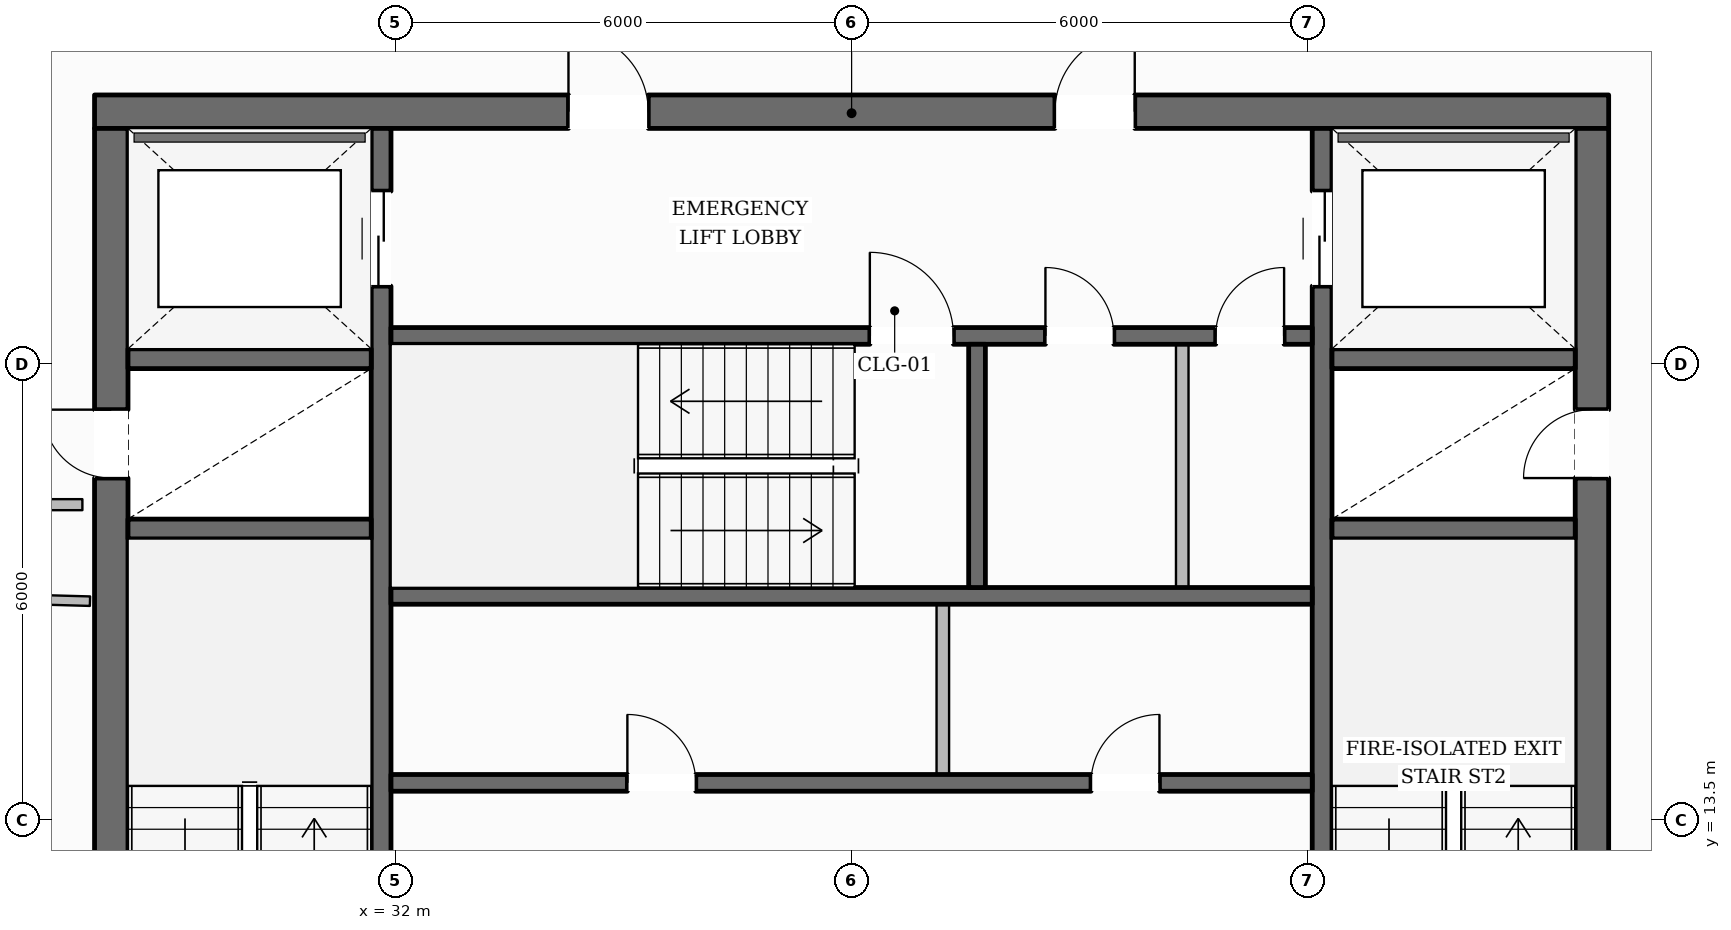
"""IFC4 building model, lengths in metres.
Left out: names, types, materials, properties, quantities, classifications, styles, units other than length and angle.
Written with IfcOpenShell. Run it as: python <this file> out.ifc"""

import sys

from ifc_helpers import new_model, si_unit, direction, frame, frame_2d, origin, place, context, subcontext, project, spatial, rectangle, extrude, element, fill, save


model = new_model("IFC4")
c1 = context("Model", 3, precision=1e-05, world=origin(), true_north=direction((0.0, 1.0)))
c2 = subcontext(c1, "Body", "Model", "MODEL_VIEW")
j1 = project(units=[si_unit("LENGTHUNIT", "METRE"), si_unit("PLANEANGLEUNIT", "RADIAN")], contexts=[c1])
p1 = place(None, origin())
s1 = spatial("IfcSite", under=j1, at=p1, CompositionType="ELEMENT")
p2 = place(p1, origin())
s2 = spatial("IfcBuilding", under=s1, at=p2, CompositionType="ELEMENT")
p3 = place(p2, frame((0.0, 0.0, 222.75)))
s3 = spatial("IfcBuildingStorey", under=s2, at=p3, CompositionType="ELEMENT", Elevation=222.75)
p4 = place(p3, frame((28.04, 22.82, 0.0), z_axis=(0.0, 0.0, 1.0), x_axis=(1.0, 0.0, 0.0)))
e1 = element("IfcWall", 1, at=p4, inside=s3, PredefinedType="SOLIDWALL", context=c2, shape_type="SweptSolid", body=[
    extrude(rectangle(XDim=19.92, YDim=0.44, at=frame_2d((9.96, 0.0))), origin(), (0.0, 0.0, 1.0), 3.6),
])
p5 = place(p4, frame((6.235, 0.0, 0.0)))
e2 = element("IfcOpeningElement", 2, at=p5, cuts=e1, PredefinedType="OPENING", context=c2, shape_type="SweptSolid", body=[
    extrude(rectangle(XDim=1.05, YDim=2.15, at=frame_2d((0.525, 1.075))), frame((0.0, 0.23, 0.0), z_axis=(0.0, -1.0, 0.0), x_axis=(1.0, 0.0, 0.0)), (0.0, 0.0, 1.0), 0.46),
])
p6 = place(p4, frame((12.635, 0.0, 0.0)))
e3 = element("IfcOpeningElement", 3, at=p6, cuts=e1, PredefinedType="OPENING", context=c2, shape_type="SweptSolid", body=[
    extrude(rectangle(XDim=1.05, YDim=2.15, at=frame_2d((0.525, 1.075))), frame((0.0, 0.23, 0.0), z_axis=(0.0, -1.0, 0.0), x_axis=(1.0, 0.0, 0.0)), (0.0, 0.0, 1.0), 0.46),
])
p7 = place(p3, frame((28.26, 9.6, 0.0), z_axis=(0.0, 0.0, 1.0), x_axis=(0.0, 1.0, 0.0)))
e4 = element("IfcWall", 4, at=p7, inside=s3, PredefinedType="SOLIDWALL", context=c2, shape_type="SweptSolid", body=[
    extrude(rectangle(XDim=13.0, YDim=0.44, at=frame_2d((6.5, 0.0))), origin(), (0.0, 0.0, 1.0), 3.6),
])
p8 = place(p7, frame((0.2, 0.0, 0.0)))
e5 = element("IfcOpeningElement", 5, at=p8, cuts=e4, PredefinedType="OPENING", context=c2, shape_type="SweptSolid", body=[
    extrude(rectangle(XDim=1.1, YDim=2.15, at=frame_2d((0.55, 1.075))), frame((0.0, 0.23, 0.0), z_axis=(0.0, -1.0, 0.0), x_axis=(1.0, 0.0, 0.0)), (0.0, 0.0, 1.0), 0.46),
])
p9 = place(p7, frame((8.4, 0.0, 0.0)))
e6 = element("IfcOpeningElement", 6, at=p9, cuts=e4, PredefinedType="OPENING", context=c2, shape_type="SweptSolid", body=[
    extrude(rectangle(XDim=0.9, YDim=2.1, at=frame_2d((0.45, 1.05))), frame((0.0, 0.23, 0.0), z_axis=(0.0, -1.0, 0.0), x_axis=(1.0, 0.0, 0.0)), (0.0, 0.0, 1.0), 0.46),
])
p10 = place(p3, frame((47.74, 9.6, 0.0), z_axis=(0.0, 0.0, 1.0), x_axis=(0.0, 1.0, 0.0)))
e7 = element("IfcWall", 7, at=p10, inside=s3, PredefinedType="SOLIDWALL", context=c2, shape_type="SweptSolid", body=[
    extrude(rectangle(XDim=13.0, YDim=0.44, at=frame_2d((6.5, 0.0))), origin(), (0.0, 0.0, 1.0), 3.6),
])
p11 = place(p10, frame((0.2, 0.0, 0.0)))
e8 = element("IfcOpeningElement", 8, at=p11, cuts=e7, PredefinedType="OPENING", context=c2, shape_type="SweptSolid", body=[
    extrude(rectangle(XDim=1.1, YDim=2.15, at=frame_2d((0.55, 1.075))), frame((0.0, 0.23, 0.0), z_axis=(0.0, -1.0, 0.0), x_axis=(1.0, 0.0, 0.0)), (0.0, 0.0, 1.0), 0.46),
])
p12 = place(p10, frame((8.4, 0.0, 0.0)))
e9 = element("IfcOpeningElement", 9, at=p12, cuts=e7, PredefinedType="OPENING", context=c2, shape_type="SweptSolid", body=[
    extrude(rectangle(XDim=0.9, YDim=2.1, at=frame_2d((0.45, 1.05))), frame((0.0, 0.23, 0.0), z_axis=(0.0, -1.0, 0.0), x_axis=(1.0, 0.0, 0.0)), (0.0, 0.0, 1.0), 0.46),
])
p13 = place(p3, frame((31.81, 9.6, 0.0), z_axis=(0.0, 0.0, 1.0), x_axis=(0.0, 1.0, 0.0)))
e10 = element("IfcWall", 10, at=p13, inside=s3, PredefinedType="SHEAR", context=c2, shape_type="SweptSolid", body=[
    extrude(rectangle(XDim=13.0, YDim=0.26, at=frame_2d((6.5, 0.0))), origin(), (0.0, 0.0, 1.0), 3.6),
])
p14 = place(p13, frame((10.925, 0.0, 0.0)))
e11 = element("IfcOpeningElement", 11, at=p14, cuts=e10, PredefinedType="OPENING", context=c2, shape_type="SweptSolid", body=[
    extrude(rectangle(XDim=1.25, YDim=2.25, at=frame_2d((0.625, 1.125))), frame((0.0, 0.14, 0.0), z_axis=(0.0, -1.0, 0.0), x_axis=(1.0, 0.0, 0.0)), (0.0, 0.0, 1.0), 0.28),
])
p15 = place(p3, frame((44.19, 9.6, 0.0), z_axis=(0.0, 0.0, 1.0), x_axis=(0.0, 1.0, 0.0)))
e12 = element("IfcWall", 12, at=p15, inside=s3, PredefinedType="SHEAR", context=c2, shape_type="SweptSolid", body=[
    extrude(rectangle(XDim=13.0, YDim=0.26, at=frame_2d((6.5, 0.0))), origin(), (0.0, 0.0, 1.0), 3.6),
])
p16 = place(p15, frame((10.925, 0.0, 0.0)))
e13 = element("IfcOpeningElement", 13, at=p16, cuts=e12, PredefinedType="OPENING", context=c2, shape_type="SweptSolid", body=[
    extrude(rectangle(XDim=1.25, YDim=2.25, at=frame_2d((0.625, 1.125))), frame((0.0, 0.14, 0.0), z_axis=(0.0, -1.0, 0.0), x_axis=(1.0, 0.0, 0.0)), (0.0, 0.0, 1.0), 0.28),
])
for number, where, z_axis, x_axis in (
    (14, (28.48, 17.33, 0.0), (0.0, 0.0, 1.0), (1.0, 0.0, 0.0)),
    (15, (28.48, 19.57, 0.0), (0.0, 0.0, 1.0), (1.0, 0.0, 0.0)),
    (16, (44.32, 17.33, 0.0), (0.0, 0.0, 1.0), (1.0, 0.0, 0.0)),
    (17, (44.32, 19.57, 0.0), (0.0, 0.0, 1.0), (1.0, 0.0, 0.0)),
):
    element("IfcWall", number, at=place(p3, frame(where, z_axis=z_axis, x_axis=x_axis)), inside=s3, PredefinedType="SHEAR", context=c2, shape_type="SweptSolid", body=[
        extrude(rectangle(XDim=3.2, YDim=0.26, at=frame_2d((1.6, 0.0))), origin(), (0.0, 0.0, 1.0), 3.6),
    ])
p17 = place(p3, frame((31.94, 19.87, 0.0), z_axis=(0.0, 0.0, 1.0), x_axis=(1.0, 0.0, 0.0)))
e18 = element("IfcWall", 18, at=p17, inside=s3, PredefinedType="SOLIDWALL", context=c2, shape_type="SweptSolid", body=[
    extrude(rectangle(XDim=12.12, YDim=0.22, at=frame_2d((6.06, 0.0))), origin(), (0.0, 0.0, 1.0), 3.6),
])
p18 = place(p17, frame((6.3, 0.0, 0.0)))
e19 = element("IfcOpeningElement", 19, at=p18, cuts=e18, PredefinedType="OPENING", context=c2, shape_type="SweptSolid", body=[
    extrude(rectangle(XDim=1.1, YDim=2.15, at=frame_2d((0.55, 1.075))), frame((0.0, 0.12, 0.0), z_axis=(0.0, -1.0, 0.0), x_axis=(1.0, 0.0, 0.0)), (0.0, 0.0, 1.0), 0.24),
])
p19 = place(p17, frame((8.61, 0.0, 0.0)))
e20 = element("IfcOpeningElement", 20, at=p19, cuts=e18, PredefinedType="OPENING", context=c2, shape_type="SweptSolid", body=[
    extrude(rectangle(XDim=0.9, YDim=2.1, at=frame_2d((0.45, 1.05))), frame((0.0, 0.12, 0.0), z_axis=(0.0, -1.0, 0.0), x_axis=(1.0, 0.0, 0.0)), (0.0, 0.0, 1.0), 0.24),
])
p20 = place(p17, frame((10.85, 0.0, 0.0)))
e21 = element("IfcOpeningElement", 21, at=p20, cuts=e18, PredefinedType="OPENING", context=c2, shape_type="SweptSolid", body=[
    extrude(rectangle(XDim=0.9, YDim=2.1, at=frame_2d((0.45, 1.05))), frame((0.0, 0.12, 0.0), z_axis=(0.0, -1.0, 0.0), x_axis=(1.0, 0.0, 0.0)), (0.0, 0.0, 1.0), 0.24),
])
p21 = place(p3, frame((31.94, 16.45, 0.0), z_axis=(0.0, 0.0, 1.0), x_axis=(1.0, 0.0, 0.0)))
e22 = element("IfcWall", 22, at=p21, inside=s3, PredefinedType="SOLIDWALL", context=c2, shape_type="SweptSolid", body=[
    extrude(rectangle(XDim=12.12, YDim=0.22, at=frame_2d((6.06, 0.0))), origin(), (0.0, 0.0, 1.0), 3.6),
])
p22 = place(p3, frame((39.65, 16.56, 0.0), z_axis=(0.0, 0.0, 1.0), x_axis=(0.0, 1.0, 0.0)))
e23 = element("IfcWall", 23, at=p22, inside=s3, PredefinedType="SOLIDWALL", context=c2, shape_type="SweptSolid", body=[
    extrude(rectangle(XDim=3.2, YDim=0.22, at=frame_2d((1.6, 0.0))), origin(), (0.0, 0.0, 1.0), 3.6),
])
p23 = place(p3, frame((31.94, 13.99, 0.0), z_axis=(0.0, 0.0, 1.0), x_axis=(1.0, 0.0, 0.0)))
e24 = element("IfcWall", 24, at=p23, inside=s3, PredefinedType="SOLIDWALL", context=c2, shape_type="SweptSolid", body=[
    extrude(rectangle(XDim=12.12, YDim=0.22, at=frame_2d((6.06, 0.0))), origin(), (0.0, 0.0, 1.0), 3.6),
])
p24 = place(p23, frame((3.11, 0.0, 0.0)))
e25 = element("IfcOpeningElement", 25, at=p24, cuts=e24, PredefinedType="OPENING", context=c2, shape_type="SweptSolid", body=[
    extrude(rectangle(XDim=0.9, YDim=2.1, at=frame_2d((0.45, 1.05))), frame((0.0, 0.12, 0.0), z_axis=(0.0, -1.0, 0.0), x_axis=(1.0, 0.0, 0.0)), (0.0, 0.0, 1.0), 0.24),
])
p25 = place(p23, frame((9.21, 0.0, 0.0)))
e26 = element("IfcOpeningElement", 26, at=p25, cuts=e24, PredefinedType="OPENING", context=c2, shape_type="SweptSolid", body=[
    extrude(rectangle(XDim=0.9, YDim=2.1, at=frame_2d((0.45, 1.05))), frame((0.0, 0.12, 0.0), z_axis=(0.0, -1.0, 0.0), x_axis=(1.0, 0.0, 0.0)), (0.0, 0.0, 1.0), 0.24),
])
p26 = place(p3, frame((14.274, 10.826, 0.0), z_axis=(0.0, 0.0, 1.0), x_axis=(0.501112789677, 0.865381980412, 0.0)))
e27 = element("IfcWall", 27, at=p26, inside=s3, PredefinedType="STANDARD", context=c2, shape_type="SweptSolid", body=[
    extrude(rectangle(XDim=39.491, YDim=0.35, at=frame_2d((19.745, 0.0))), origin(), (0.0, 0.0, 1.0), 3.132),
])
p27 = place(p26, frame((29.018, 0.0, 0.0)))
e28 = element("IfcOpeningElement", 28, at=p27, cuts=e27, PredefinedType="OPENING", context=c2, shape_type="SweptSolid", body=[
    extrude(rectangle(XDim=1.0, YDim=2.2, at=frame_2d((0.5, 1.1))), frame((0.0, 0.185, 0.0), z_axis=(0.0, -1.0, 0.0), x_axis=(1.0, 0.0, 0.0)), (0.0, 0.0, 1.0), 0.37),
])
p28 = place(p26, frame((35.08, 0.0, 0.65)))
e29 = element("IfcOpeningElement", 29, at=p28, cuts=e27, PredefinedType="OPENING", context=c2, shape_type="SweptSolid", body=[
    extrude(rectangle(XDim=1.45, YDim=1.75, at=frame_2d((0.725, 0.875))), frame((0.0, 0.185, 0.0), z_axis=(0.0, -1.0, 0.0), x_axis=(1.0, 0.0, 0.0)), (0.0, 0.0, 1.0), 0.37),
])
p29 = place(p26, frame((22.233, 0.0, 0.65)))
e30 = element("IfcOpeningElement", 30, at=p29, cuts=e27, PredefinedType="OPENING", context=c2, shape_type="SweptSolid", body=[
    extrude(rectangle(XDim=1.45, YDim=1.75, at=frame_2d((0.725, 0.875))), frame((0.0, 0.185, 0.0), z_axis=(0.0, -1.0, 0.0), x_axis=(1.0, 0.0, 0.0)), (0.0, 0.0, 1.0), 0.37),
])
p30 = place(p26, frame((9.385, 0.0, 0.65)))
e31 = element("IfcOpeningElement", 31, at=p30, cuts=e27, PredefinedType="OPENING", context=c2, shape_type="SweptSolid", body=[
    extrude(rectangle(XDim=1.45, YDim=1.75, at=frame_2d((0.725, 0.875))), frame((0.0, 0.185, 0.0), z_axis=(0.0, -1.0, 0.0), x_axis=(1.0, 0.0, 0.0)), (0.0, 0.0, 1.0), 0.37),
])
p31 = place(p26, frame((2.962, 0.0, 0.65)))
e32 = element("IfcOpeningElement", 32, at=p31, cuts=e27, PredefinedType="OPENING", context=c2, shape_type="SweptSolid", body=[
    extrude(rectangle(XDim=1.45, YDim=1.75, at=frame_2d((0.725, 0.875))), frame((0.0, 0.185, 0.0), z_axis=(0.0, -1.0, 0.0), x_axis=(1.0, 0.0, 0.0)), (0.0, 0.0, 1.0), 0.37),
])
p32 = place(p3, frame((41.804, 45.08, 0.0), z_axis=(0.0, 0.0, 1.0), x_axis=(0.493108750239, -0.869967677812, 0.0)))
e33 = element("IfcWall", 33, at=p32, inside=s3, PredefinedType="STANDARD", context=c2, shape_type="SweptSolid", body=[
    extrude(rectangle(XDim=38.876, YDim=0.35, at=frame_2d((19.438, 0.0))), origin(), (0.0, 0.0, 1.0), 3.132),
])
p33 = place(p32, frame((28.557, 0.0, 0.0)))
e34 = element("IfcOpeningElement", 34, at=p33, cuts=e33, PredefinedType="OPENING", context=c2, shape_type="SweptSolid", body=[
    extrude(rectangle(XDim=1.0, YDim=2.2, at=frame_2d((0.5, 1.1))), frame((0.0, 0.185, 0.0), z_axis=(0.0, -1.0, 0.0), x_axis=(1.0, 0.0, 0.0)), (0.0, 0.0, 1.0), 0.37),
])
p34 = place(p32, frame((34.516, 0.0, 0.65)))
e35 = element("IfcOpeningElement", 35, at=p34, cuts=e33, PredefinedType="OPENING", context=c2, shape_type="SweptSolid", body=[
    extrude(rectangle(XDim=1.45, YDim=1.75, at=frame_2d((0.725, 0.875))), frame((0.0, 0.185, 0.0), z_axis=(0.0, -1.0, 0.0), x_axis=(1.0, 0.0, 0.0)), (0.0, 0.0, 1.0), 0.37),
])
p35 = place(p32, frame((21.876, 0.0, 0.65)))
e36 = element("IfcOpeningElement", 36, at=p35, cuts=e33, PredefinedType="OPENING", context=c2, shape_type="SweptSolid", body=[
    extrude(rectangle(XDim=1.45, YDim=1.75, at=frame_2d((0.725, 0.875))), frame((0.0, 0.185, 0.0), z_axis=(0.0, -1.0, 0.0), x_axis=(1.0, 0.0, 0.0)), (0.0, 0.0, 1.0), 0.37),
])
p36 = place(p32, frame((9.237, 0.0, 0.65)))
e37 = element("IfcOpeningElement", 37, at=p36, cuts=e33, PredefinedType="OPENING", context=c2, shape_type="SweptSolid", body=[
    extrude(rectangle(XDim=1.45, YDim=1.75, at=frame_2d((0.725, 0.875))), frame((0.0, 0.185, 0.0), z_axis=(0.0, -1.0, 0.0), x_axis=(1.0, 0.0, 0.0)), (0.0, 0.0, 1.0), 0.37),
])
p37 = place(p32, frame((2.917, 0.0, 0.65)))
e38 = element("IfcOpeningElement", 38, at=p37, cuts=e33, PredefinedType="OPENING", context=c2, shape_type="SweptSolid", body=[
    extrude(rectangle(XDim=1.45, YDim=1.75, at=frame_2d((0.725, 0.875))), frame((0.0, 0.185, 0.0), z_axis=(0.0, -1.0, 0.0), x_axis=(1.0, 0.0, 0.0)), (0.0, 0.0, 1.0), 0.37),
])
p38 = place(p3, frame((39.2, 14.1, 0.0), z_axis=(0.0, 0.0, 1.0), x_axis=(0.0, 1.0, 0.0)))
e39 = element("IfcWall", 39, at=p38, inside=s3, PredefinedType="PARTITIONING", context=c2, shape_type="SweptSolid", body=[
    extrude(rectangle(XDim=2.24, YDim=0.165, at=frame_2d((1.12, 0.0))), origin(), (0.0, 0.0, 1.0), 3.6),
])
p39 = place(p3, frame((42.35, 16.56, 0.0), z_axis=(0.0, 0.0, 1.0), x_axis=(0.0, 1.0, 0.0)))
e40 = element("IfcWall", 40, at=p39, inside=s3, PredefinedType="PARTITIONING", context=c2, shape_type="SweptSolid", body=[
    extrude(rectangle(XDim=3.2, YDim=0.165, at=frame_2d((1.6, 0.0))), origin(), (0.0, 0.0, 1.0), 3.6),
])
p40 = place(p3, frame((27.88, 17.65, 0.0), z_axis=(0.0, 0.0, 1.0), x_axis=(-1.0, 0.0, 0.0)))
e41 = element("IfcWall", 41, at=p40, inside=s3, PredefinedType="PARTITIONING", context=c2, shape_type="SweptSolid", body=[
    extrude(rectangle(XDim=1.82, YDim=0.145, at=frame_2d((0.91, 0.0))), origin(), (0.0, 0.0, 1.0), 3.6),
])
p41 = place(p3, frame((27.98, 16.38, 0.0), z_axis=(0.0, 0.0, 1.0), x_axis=(-0.999608903911, 0.027964964169, 0.0)))
e42 = element("IfcWall", 42, at=p41, inside=s3, PredefinedType="PARTITIONING", context=c2, shape_type="SweptSolid", body=[
    extrude(rectangle(XDim=9.691, YDim=0.125, at=frame_2d((4.845, 0.0))), origin(), (0.0, 0.0, 1.0), 3.141),
])
p42 = place(p18, origin())
e43 = element("IfcDoor", 43, at=p42, inside=s3, OperationType="SINGLE_SWING_LEFT", PredefinedType="DOOR", context=c2, shape_type="SweptSolid", body=[
    extrude(rectangle(XDim=1.1, YDim=2.15, at=frame_2d((0.55, 1.075))), frame((0.0, 0.025, 0.0), z_axis=(0.0, -1.0, 0.0), x_axis=(1.0, 0.0, 0.0)), (0.0, 0.0, 1.0), 0.05),
])
fill(e19, e43)
p43 = place(p9, origin())
e44 = element("IfcDoor", 44, at=p43, inside=s3, OperationType="SINGLE_SWING_RIGHT", PredefinedType="DOOR", context=c2, shape_type="SweptSolid", body=[
    extrude(rectangle(XDim=0.9, YDim=2.1, at=frame_2d((0.45, 1.05))), frame((0.0, 0.025, 0.0), z_axis=(0.0, -1.0, 0.0), x_axis=(1.0, 0.0, 0.0)), (0.0, 0.0, 1.0), 0.05),
])
fill(e6, e44)
p44 = place(p12, origin())
e45 = element("IfcDoor", 45, at=p44, inside=s3, OperationType="SINGLE_SWING_LEFT", PredefinedType="DOOR", context=c2, shape_type="SweptSolid", body=[
    extrude(rectangle(XDim=0.9, YDim=2.1, at=frame_2d((0.45, 1.05))), frame((0.0, 0.025, 0.0), z_axis=(0.0, -1.0, 0.0), x_axis=(1.0, 0.0, 0.0)), (0.0, 0.0, 1.0), 0.05),
])
fill(e9, e45)
p45 = place(p5, origin())
e46 = element("IfcDoor", 46, at=p45, inside=s3, OperationType="SINGLE_SWING_LEFT", PredefinedType="DOOR", context=c2, shape_type="SweptSolid", body=[
    extrude(rectangle(XDim=1.05, YDim=2.15, at=frame_2d((0.525, 1.075))), frame((0.0, 0.025, 0.0), z_axis=(0.0, -1.0, 0.0), x_axis=(1.0, 0.0, 0.0)), (0.0, 0.0, 1.0), 0.05),
])
fill(e2, e46)
p46 = place(p6, origin())
e47 = element("IfcDoor", 47, at=p46, inside=s3, OperationType="SINGLE_SWING_RIGHT", PredefinedType="DOOR", context=c2, shape_type="SweptSolid", body=[
    extrude(rectangle(XDim=1.05, YDim=2.15, at=frame_2d((0.525, 1.075))), frame((0.0, 0.025, 0.0), z_axis=(0.0, -1.0, 0.0), x_axis=(1.0, 0.0, 0.0)), (0.0, 0.0, 1.0), 0.05),
])
fill(e3, e47)
p47 = place(p14, origin())
e48 = element("IfcDoor", 48, at=p47, inside=s3, OperationType="DOUBLE_DOOR_SLIDING", PredefinedType="DOOR", context=c2, shape_type="SweptSolid", body=[
    extrude(rectangle(XDim=1.25, YDim=2.25, at=frame_2d((0.625, 1.125))), frame((0.0, 0.025, 0.0), z_axis=(0.0, -1.0, 0.0), x_axis=(1.0, 0.0, 0.0)), (0.0, 0.0, 1.0), 0.05),
])
fill(e11, e48)
p48 = place(p16, origin())
e49 = element("IfcDoor", 49, at=p48, inside=s3, OperationType="DOUBLE_DOOR_SLIDING", PredefinedType="DOOR", context=c2, shape_type="SweptSolid", body=[
    extrude(rectangle(XDim=1.25, YDim=2.25, at=frame_2d((0.625, 1.125))), frame((0.0, 0.025, 0.0), z_axis=(0.0, -1.0, 0.0), x_axis=(1.0, 0.0, 0.0)), (0.0, 0.0, 1.0), 0.05),
])
fill(e13, e49)
p49 = place(p24, origin())
e50 = element("IfcDoor", 50, at=p49, inside=s3, OperationType="SINGLE_SWING_LEFT", PredefinedType="DOOR", context=c2, shape_type="SweptSolid", body=[
    extrude(rectangle(XDim=0.9, YDim=2.1, at=frame_2d((0.45, 1.05))), frame((0.0, 0.025, 0.0), z_axis=(0.0, -1.0, 0.0), x_axis=(1.0, 0.0, 0.0)), (0.0, 0.0, 1.0), 0.05),
])
fill(e25, e50)
p50 = place(p25, origin())
e51 = element("IfcDoor", 51, at=p50, inside=s3, OperationType="SINGLE_SWING_RIGHT", PredefinedType="DOOR", context=c2, shape_type="SweptSolid", body=[
    extrude(rectangle(XDim=0.9, YDim=2.1, at=frame_2d((0.45, 1.05))), frame((0.0, 0.025, 0.0), z_axis=(0.0, -1.0, 0.0), x_axis=(1.0, 0.0, 0.0)), (0.0, 0.0, 1.0), 0.05),
])
fill(e26, e51)
p51 = place(p19, origin())
e52 = element("IfcDoor", 52, at=p51, inside=s3, OperationType="SINGLE_SWING_LEFT", PredefinedType="DOOR", context=c2, shape_type="SweptSolid", body=[
    extrude(rectangle(XDim=0.9, YDim=2.1, at=frame_2d((0.45, 1.05))), frame((0.0, 0.025, 0.0), z_axis=(0.0, -1.0, 0.0), x_axis=(1.0, 0.0, 0.0)), (0.0, 0.0, 1.0), 0.05),
])
fill(e20, e52)
p52 = place(p20, origin())
e53 = element("IfcDoor", 53, at=p52, inside=s3, OperationType="SINGLE_SWING_RIGHT", PredefinedType="DOOR", context=c2, shape_type="SweptSolid", body=[
    extrude(rectangle(XDim=0.9, YDim=2.1, at=frame_2d((0.45, 1.05))), frame((0.0, 0.025, 0.0), z_axis=(0.0, -1.0, 0.0), x_axis=(1.0, 0.0, 0.0)), (0.0, 0.0, 1.0), 0.05),
])
fill(e21, e53)
save(model, sys.argv[1])
